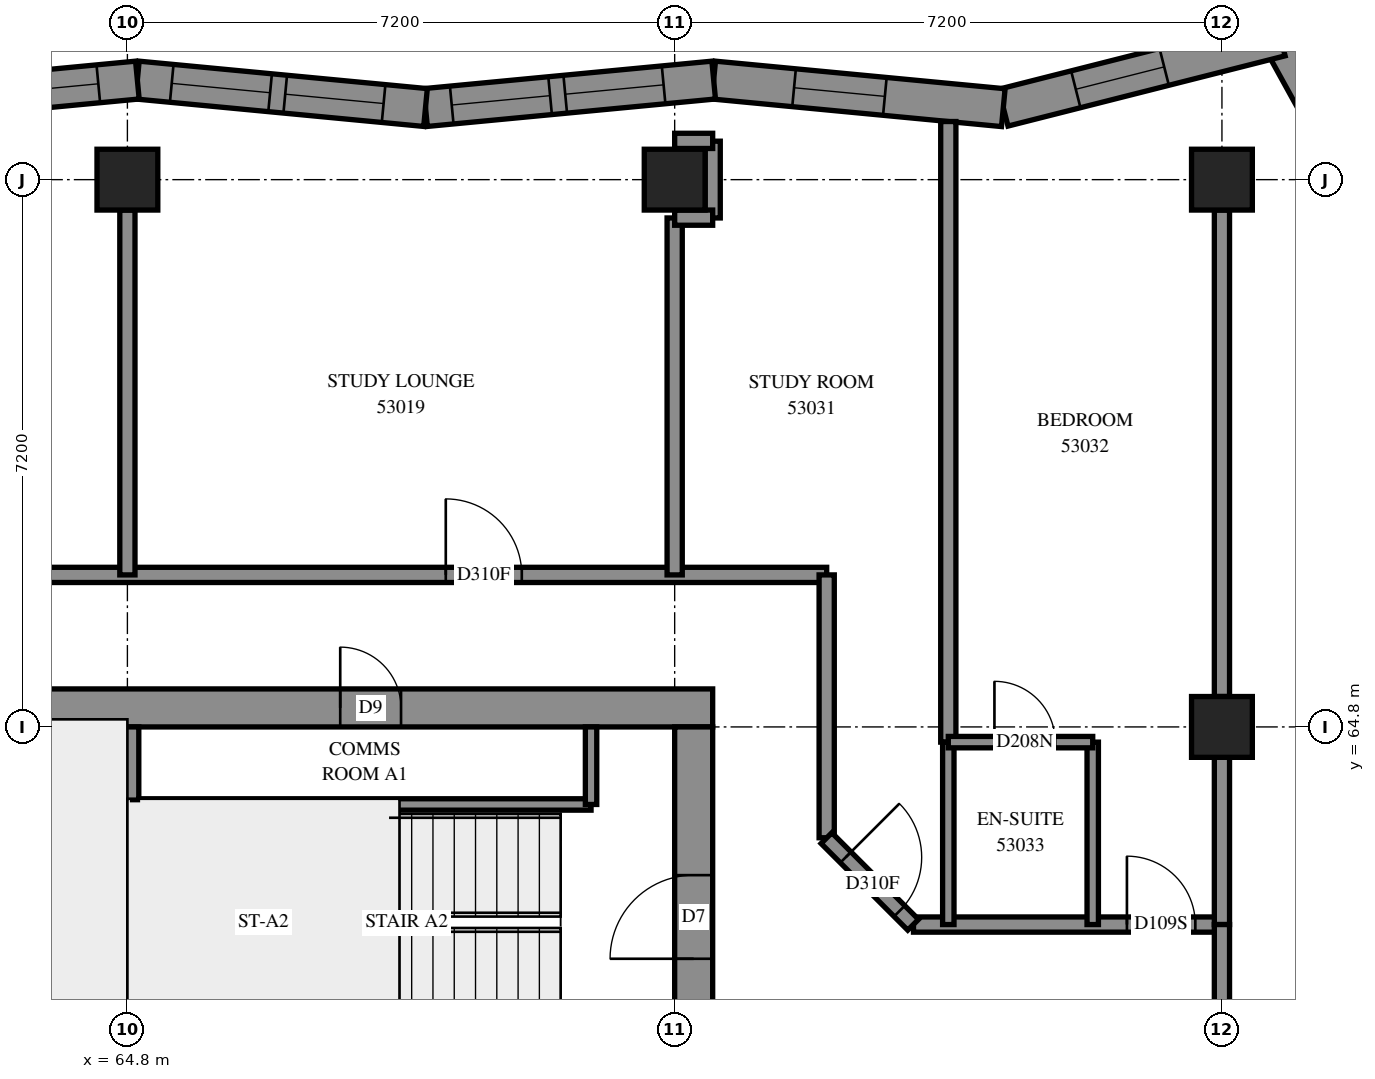
"""IFC4 building model, lengths in metres.
Left out: names, types, materials, properties, quantities, classifications, styles, units other than length and angle.
Written with IfcOpenShell. Run it as: python <this file> out.ifc"""

import sys

from ifc_helpers import new_model, si_unit, direction, frame, frame_2d, origin, origin_2d, place, context, subcontext, project, spatial, polyline, rectangle, outline, extrude, element, fill, save


model = new_model("IFC4")
c1 = context("Model", 3, precision=1e-05, world=origin(), true_north=direction((0.0, 1.0)))
c2 = subcontext(c1, "Body", "Model", "MODEL_VIEW")
j1 = project(units=[si_unit("LENGTHUNIT", "METRE"), si_unit("PLANEANGLEUNIT", "RADIAN")], contexts=[c1])
p1 = place(None, origin())
s1 = spatial("IfcSite", under=j1, at=p1, CompositionType="ELEMENT")
p2 = place(p1, origin())
s2 = spatial("IfcBuilding", under=s1, at=p2, CompositionType="ELEMENT")
p3 = place(p2, frame((0.0, 0.0, 196.4)))
s3 = spatial("IfcBuildingStorey", under=s2, at=p3, CompositionType="ELEMENT", Elevation=196.4)
for number, where, z_axis, x_axis in (
    (1, (64.8, 72.0, 0.0), (0.0, 0.0, 1.0), (1.0, 0.0, 0.0)),
    (2, (72.0, 72.0, 0.0), (0.0, 0.0, 1.0), (1.0, 0.0, 0.0)),
    (3, (79.2, 64.8, 0.0), (0.0, 0.0, 1.0), (1.0, 0.0, 0.0)),
    (4, (79.2, 72.0, 0.0), (0.0, 0.0, 1.0), (1.0, 0.0, 0.0)),
):
    element("IfcColumn", number, at=place(p3, frame(where, z_axis=z_axis, x_axis=x_axis)), inside=s3, PredefinedType="COLUMN", context=c2, shape_type="SweptSolid", body=[
        extrude(rectangle(XDim=0.8, YDim=0.8, at=origin_2d()), origin(), (0.0, 0.0, 1.0), 3.1),
    ])
p4 = place(p3, frame((57.1, 65.05, -0.3), z_axis=(0.0, 0.0, 1.0), x_axis=(1.0, 0.0, 0.0)))
e5 = element("IfcWall", 5, at=p4, inside=s3, PredefinedType="SHEAR", context=c2, shape_type="SweptSolid", body=[
    extrude(rectangle(XDim=15.4, YDim=0.5, at=frame_2d((7.7, 0.0))), origin(), (0.0, 0.0, 1.0), 2.7),
])
p5 = place(p4, frame((10.5, 0.0, 0.3)))
e6 = element("IfcOpeningElement", 6, at=p5, cuts=e5, PredefinedType="OPENING", context=c2, shape_type="SweptSolid", body=[
    extrude(rectangle(XDim=0.8, YDim=2.1, at=frame_2d((0.4, 1.05))), frame((0.0, 0.26, 0.0), z_axis=(0.0, -1.0, 0.0), x_axis=(1.0, 0.0, 0.0)), (0.0, 0.0, 1.0), 0.52),
])
p6 = place(p3, frame((72.25, 50.4, -0.3), z_axis=(0.0, 0.0, 1.0), x_axis=(0.0, 1.0, 0.0)))
e7 = element("IfcWall", 7, at=p6, inside=s3, PredefinedType="SHEAR", context=c2, shape_type="SweptSolid", body=[
    extrude(rectangle(XDim=14.4, YDim=0.5, at=frame_2d((7.2, 0.0))), origin(), (0.0, 0.0, 1.0), 2.7),
])
p7 = place(p6, frame((4.55, 0.0, 0.3)))
e8 = element("IfcOpeningElement", 8, at=p7, cuts=e7, PredefinedType="OPENING", context=c2, shape_type="SweptSolid", body=[
    extrude(rectangle(XDim=1.1, YDim=2.1, at=frame_2d((0.55, 1.05))), frame((0.0, 0.26, 0.0), z_axis=(0.0, -1.0, 0.0), x_axis=(1.0, 0.0, 0.0)), (0.0, 0.0, 1.0), 0.52),
])
p8 = place(p6, frame((11.35, 0.0, 0.3)))
e9 = element("IfcOpeningElement", 9, at=p8, cuts=e7, PredefinedType="OPENING", context=c2, shape_type="SweptSolid", body=[
    extrude(rectangle(XDim=1.1, YDim=2.1, at=frame_2d((0.55, 1.05))), frame((0.0, 0.26, 0.0), z_axis=(0.0, -1.0, 0.0), x_axis=(1.0, 0.0, 0.0)), (0.0, 0.0, 1.0), 0.52),
])
p9 = place(p3, frame((64.8, 60.6, 0.0), z_axis=(0.0, 0.0, 1.0), x_axis=(0.0, 1.0, 0.0)))
e10 = element("IfcWall", 10, at=p9, inside=s3, PredefinedType="SOLIDWALL", context=c2, shape_type="SweptSolid", body=[
    extrude(rectangle(XDim=4.2, YDim=0.3, at=frame_2d((2.1, 0.0))), origin(), (0.0, 0.0, 1.0), 3.1),
])
p10 = place(p3, frame((81.575, 70.963, 0.0), z_axis=(0.0, 0.0, 1.0), x_axis=(-0.4832922013, 0.8754591071, 0.0)))
e11 = element("IfcWall", 11, at=p10, inside=s3, PredefinedType="SOLIDWALL", context=c2, shape_type="SweptSolid", body=[
    extrude(outline(polyline([(0.049, -0.25), (3.515, -0.25), (3.129, 0.25), (-0.049, 0.25), (0.049, -0.25)])), origin(), (0.0, 0.0, 1.0), 3.1),
])
p11 = place(p10, frame((0.755, 0.0, 0.45)))
e12 = element("IfcOpeningElement", 12, at=p11, cuts=e11, PredefinedType="OPENING", context=c2, shape_type="SweptSolid", body=[
    extrude(rectangle(XDim=1.2, YDim=2.5, at=frame_2d((0.6, 1.25))), frame((0.0, 0.26, 0.0), z_axis=(0.0, -1.0, 0.0), x_axis=(1.0, 0.0, 0.0)), (0.0, 0.0, 1.0), 0.52),
])
p12 = place(p3, frame((79.969, 73.871, 0.0), z_axis=(0.0, 0.0, 1.0), x_axis=(-0.9693348908, -0.2457435035, 0.0)))
e13 = element("IfcWall", 13, at=p12, inside=s3, PredefinedType="SOLIDWALL", context=c2, shape_type="SweptSolid", body=[
    extrude(outline(polyline([(-0.193, -0.25), (3.718, -0.25), (3.805, 0.25), (0.193, 0.25), (-0.193, -0.25)])), origin(), (0.0, 0.0, 1.0), 3.1),
])
p13 = place(p12, frame((1.578, 0.0, 0.45)))
e14 = element("IfcOpeningElement", 14, at=p13, cuts=e13, PredefinedType="OPENING", context=c2, shape_type="SweptSolid", body=[
    extrude(rectangle(XDim=1.2, YDim=2.5, at=frame_2d((0.6, 1.25))), frame((0.0, 0.26, 0.0), z_axis=(0.0, -1.0, 0.0), x_axis=(1.0, 0.0, 0.0)), (0.0, 0.0, 1.0), 0.52),
])
p14 = place(p3, frame((76.324, 72.947, 0.0), z_axis=(0.0, 0.0, 1.0), x_axis=(-0.99549559, 0.0948078598, 0.0)))
e15 = element("IfcWall", 15, at=p14, inside=s3, PredefinedType="SOLIDWALL", context=c2, shape_type="SweptSolid", body=[
    extrude(outline(polyline([(0.043, -0.25), (3.852, -0.25), (3.804, 0.25), (-0.043, 0.25), (0.043, -0.25)])), origin(), (0.0, 0.0, 1.0), 3.1),
])
p15 = place(p14, frame((1.565, 0.0, 0.45)))
e16 = element("IfcOpeningElement", 16, at=p15, cuts=e15, PredefinedType="OPENING", context=c2, shape_type="SweptSolid", body=[
    extrude(rectangle(XDim=1.2, YDim=2.5, at=frame_2d((0.6, 1.25))), frame((0.0, 0.26, 0.0), z_axis=(0.0, -1.0, 0.0), x_axis=(1.0, 0.0, 0.0)), (0.0, 0.0, 1.0), 0.52),
])
p16 = place(p3, frame((72.513, 73.31, 0.0), z_axis=(0.0, 0.0, 1.0), x_axis=(-0.9954966527, -0.0947967005, 0.0)))
e17 = element("IfcWall", 17, at=p16, inside=s3, PredefinedType="SOLIDWALL", context=c2, shape_type="SweptSolid", body=[
    extrude(outline(polyline([(-0.024, -0.25), (3.784, -0.25), (3.832, 0.25), (0.024, 0.25), (-0.024, -0.25)])), origin(), (0.0, 0.0, 1.0), 3.1),
])
p17 = place(p16, frame((0.662, 0.0, 0.45)))
e18 = element("IfcOpeningElement", 18, at=p17, cuts=e17, PredefinedType="OPENING", context=c2, shape_type="SweptSolid", body=[
    extrude(rectangle(XDim=1.3, YDim=2.5, at=frame_2d((0.65, 1.25))), frame((0.0, 0.26, 0.0), z_axis=(0.0, -1.0, 0.0), x_axis=(1.0, 0.0, 0.0)), (0.0, 0.0, 1.0), 0.52),
])
p18 = place(p16, frame((2.162, 0.0, 0.45)))
e19 = element("IfcOpeningElement", 19, at=p18, cuts=e17, PredefinedType="OPENING", context=c2, shape_type="SweptSolid", body=[
    extrude(rectangle(XDim=1.3, YDim=2.5, at=frame_2d((0.65, 1.25))), frame((0.0, 0.26, 0.0), z_axis=(0.0, -1.0, 0.0), x_axis=(1.0, 0.0, 0.0)), (0.0, 0.0, 1.0), 0.52),
])
p19 = place(p3, frame((68.722, 72.949, 0.0), z_axis=(0.0, 0.0, 1.0), x_axis=(-0.9954966527, 0.0947967005, 0.0)))
e20 = element("IfcWall", 20, at=p19, inside=s3, PredefinedType="SOLIDWALL", context=c2, shape_type="SweptSolid", body=[
    extrude(outline(polyline([(0.024, -0.25), (3.832, -0.25), (3.784, 0.25), (-0.024, 0.25), (0.024, -0.25)])), origin(), (0.0, 0.0, 1.0), 3.1),
])
p20 = place(p19, frame((0.554, 0.0, 0.45)))
e21 = element("IfcOpeningElement", 21, at=p20, cuts=e20, PredefinedType="OPENING", context=c2, shape_type="SweptSolid", body=[
    extrude(rectangle(XDim=1.3, YDim=2.5, at=frame_2d((0.65, 1.25))), frame((0.0, 0.26, 0.0), z_axis=(0.0, -1.0, 0.0), x_axis=(1.0, 0.0, 0.0)), (0.0, 0.0, 1.0), 0.52),
])
p21 = place(p19, frame((2.054, 0.0, 0.45)))
e22 = element("IfcOpeningElement", 22, at=p21, cuts=e20, PredefinedType="OPENING", context=c2, shape_type="SweptSolid", body=[
    extrude(rectangle(XDim=1.3, YDim=2.5, at=frame_2d((0.65, 1.25))), frame((0.0, 0.26, 0.0), z_axis=(0.0, -1.0, 0.0), x_axis=(1.0, 0.0, 0.0)), (0.0, 0.0, 1.0), 0.52),
])
p22 = place(p3, frame((64.931, 73.31, 0.0), z_axis=(0.0, 0.0, 1.0), x_axis=(-0.9954966527, -0.0947967005, 0.0)))
e23 = element("IfcWall", 23, at=p22, inside=s3, PredefinedType="SOLIDWALL", context=c2, shape_type="SweptSolid", body=[
    extrude(outline(polyline([(-0.024, -0.25), (3.784, -0.25), (3.832, 0.25), (0.024, 0.25), (-0.024, -0.25)])), origin(), (0.0, 0.0, 1.0), 3.1),
])
p23 = place(p22, frame((0.516, 0.0, 0.45)))
e24 = element("IfcOpeningElement", 24, at=p23, cuts=e23, PredefinedType="OPENING", context=c2, shape_type="SweptSolid", body=[
    extrude(rectangle(XDim=1.3, YDim=2.5, at=frame_2d((0.65, 1.25))), frame((0.0, 0.26, 0.0), z_axis=(0.0, -1.0, 0.0), x_axis=(1.0, 0.0, 0.0)), (0.0, 0.0, 1.0), 0.52),
])
p24 = place(p22, frame((2.016, 0.0, 0.45)))
e25 = element("IfcOpeningElement", 25, at=p24, cuts=e23, PredefinedType="OPENING", context=c2, shape_type="SweptSolid", body=[
    extrude(rectangle(XDim=1.3, YDim=2.5, at=frame_2d((0.65, 1.25))), frame((0.0, 0.26, 0.0), z_axis=(0.0, -1.0, 0.0), x_axis=(1.0, 0.0, 0.0)), (0.0, 0.0, 1.0), 0.52),
])
p25 = place(p3, frame((64.95, 63.78, 0.0), z_axis=(0.0, 0.0, 1.0), x_axis=(1.0, 0.0, 0.0)))
e26 = element("IfcWall", 26, at=p25, inside=s3, PredefinedType="PARTITIONING", context=c2, shape_type="SweptSolid", body=[
    extrude(rectangle(XDim=5.95, YDim=0.15, at=frame_2d((2.975, 0.0))), origin(), (0.0, 0.0, 1.0), 3.1),
])
p26 = place(p3, frame((70.9, 63.78, 0.0), z_axis=(0.0, 0.0, 1.0), x_axis=(0.0, 1.0, 0.0)))
e27 = element("IfcWall", 27, at=p26, inside=s3, PredefinedType="PARTITIONING", context=c2, shape_type="SweptSolid", body=[
    extrude(rectangle(XDim=1.02, YDim=0.15, at=frame_2d((0.51, 0.0))), origin(), (0.0, 0.0, 1.0), 3.1),
])
p27 = place(p3, frame((55.6, 66.8, 0.0), z_axis=(0.0, 0.0, 1.0), x_axis=(1.0, 0.0, 0.0)))
e28 = element("IfcWall", 28, at=p27, inside=s3, PredefinedType="PARTITIONING", context=c2, shape_type="SweptSolid", body=[
    extrude(rectangle(XDim=18.4, YDim=0.2, at=frame_2d((9.2, 0.0))), origin(), (0.0, 0.0, 1.0), 3.1),
])
p28 = place(p27, frame((5.886, 0.0, 0.0)))
e29 = element("IfcOpeningElement", 29, at=p28, cuts=e28, PredefinedType="OPENING", context=c2, shape_type="SweptSolid", body=[
    extrude(rectangle(XDim=1.0, YDim=2.1, at=frame_2d((0.5, 1.05))), frame((0.0, 0.11, 0.0), z_axis=(0.0, -1.0, 0.0), x_axis=(1.0, 0.0, 0.0)), (0.0, 0.0, 1.0), 0.22),
])
p29 = place(p27, frame((13.389, 0.0, 0.0)))
e30 = element("IfcOpeningElement", 30, at=p29, cuts=e28, PredefinedType="OPENING", context=c2, shape_type="SweptSolid", body=[
    extrude(rectangle(XDim=1.0, YDim=2.1, at=frame_2d((0.5, 1.05))), frame((0.0, 0.11, 0.0), z_axis=(0.0, -1.0, 0.0), x_axis=(1.0, 0.0, 0.0)), (0.0, 0.0, 1.0), 0.22),
])
p30 = place(p3, frame((75.6, 64.6, 0.0), z_axis=(0.0, 0.0, 1.0), x_axis=(0.0, 1.0, 0.0)))
e31 = element("IfcWall", 31, at=p30, inside=s3, PredefinedType="PARTITIONING", context=c2, shape_type="SweptSolid", body=[
    extrude(rectangle(XDim=8.165, YDim=0.2, at=frame_2d((4.082, 0.0))), origin(), (0.0, 0.0, 1.0), 3.1),
])
p31 = place(p3, frame((79.2, 65.2, 0.0), z_axis=(0.0, 0.0, 1.0), x_axis=(0.0, 1.0, 0.0)))
e32 = element("IfcWall", 32, at=p31, inside=s3, PredefinedType="PARTITIONING", context=c2, shape_type="SweptSolid", body=[
    extrude(rectangle(XDim=6.4, YDim=0.2, at=frame_2d((3.2, 0.0))), origin(), (0.0, 0.0, 1.0), 3.1),
])
p32 = place(p3, frame((64.8, 66.8, 0.0), z_axis=(0.0, 0.0, 1.0), x_axis=(0.0, 1.0, 0.0)))
e33 = element("IfcWall", 33, at=p32, inside=s3, PredefinedType="PARTITIONING", context=c2, shape_type="SweptSolid", body=[
    extrude(rectangle(XDim=4.8, YDim=0.2, at=frame_2d((2.4, 0.0))), origin(), (0.0, 0.0, 1.0), 3.1),
])
p33 = place(p3, frame((72.0, 66.8, 0.0), z_axis=(0.0, 0.0, 1.0), x_axis=(0.0, 1.0, 0.0)))
e34 = element("IfcWall", 34, at=p33, inside=s3, PredefinedType="PARTITIONING", context=c2, shape_type="SweptSolid", body=[
    extrude(rectangle(XDim=4.696, YDim=0.2, at=frame_2d((2.348, 0.0))), origin(), (0.0, 0.0, 1.0), 3.1),
])
p34 = place(p3, frame((75.142, 62.2, 0.0), z_axis=(0.0, 0.0, 1.0), x_axis=(1.0, 0.0, 0.0)))
e35 = element("IfcWall", 35, at=p34, inside=s3, PredefinedType="PARTITIONING", context=c2, shape_type="SweptSolid", body=[
    extrude(rectangle(XDim=4.058, YDim=0.2, at=frame_2d((2.029, 0.0))), origin(), (0.0, 0.0, 1.0), 3.1),
])
p35 = place(p34, frame((2.808, 0.0, 0.0)))
e36 = element("IfcOpeningElement", 36, at=p35, cuts=e35, PredefinedType="OPENING", context=c2, shape_type="SweptSolid", body=[
    extrude(rectangle(XDim=0.9, YDim=2.1, at=frame_2d((0.45, 1.05))), frame((0.0, 0.11, 0.0), z_axis=(0.0, -1.0, 0.0), x_axis=(1.0, 0.0, 0.0)), (0.0, 0.0, 1.0), 0.22),
])
p36 = place(p3, frame((74.0, 63.342, 0.0), z_axis=(0.0, 0.0, 1.0), x_axis=(0.0, 1.0, 0.0)))
e37 = element("IfcWall", 37, at=p36, inside=s3, PredefinedType="PARTITIONING", context=c2, shape_type="SweptSolid", body=[
    extrude(rectangle(XDim=3.458, YDim=0.2, at=frame_2d((1.729, 0.0))), origin(), (0.0, 0.0, 1.0), 3.1),
])
for number, where, z_axis, x_axis in (
    (38, (75.6, 62.2, 0.0), (0.0, 0.0, 1.0), (0.0, 1.0, 0.0)),
    (39, (77.5, 62.2, 0.0), (0.0, 0.0, 1.0), (0.0, 1.0, 0.0)),
):
    element("IfcWall", number, at=place(p3, frame(where, z_axis=z_axis, x_axis=x_axis)), inside=s3, PredefinedType="PARTITIONING", context=c2, shape_type="SweptSolid", body=[
        extrude(rectangle(XDim=2.4, YDim=0.15, at=frame_2d((1.2, 0.0))), origin(), (0.0, 0.0, 1.0), 3.1),
    ])
p37 = place(p3, frame((79.2, 62.2, 0.0), z_axis=(0.0, 0.0, 1.0), x_axis=(0.0, 1.0, 0.0)))
e40 = element("IfcWall", 40, at=p37, inside=s3, PredefinedType="PARTITIONING", context=c2, shape_type="SweptSolid", body=[
    extrude(rectangle(XDim=2.2, YDim=0.2, at=frame_2d((1.1, 0.0))), origin(), (0.0, 0.0, 1.0), 3.1),
])
p38 = place(p3, frame((79.2, 60.2, 0.0), z_axis=(0.0, 0.0, 1.0), x_axis=(0.0, 1.0, 0.0)))
e41 = element("IfcWall", 41, at=p38, inside=s3, PredefinedType="PARTITIONING", context=c2, shape_type="SweptSolid", body=[
    extrude(rectangle(XDim=2.0, YDim=0.2, at=frame_2d((1.0, 0.0))), origin(), (0.0, 0.0, 1.0), 3.1),
])
p39 = place(p3, frame((75.6, 64.6, 0.0), z_axis=(0.0, 0.0, 1.0), x_axis=(1.0, 0.0, 0.0)))
e42 = element("IfcWall", 42, at=p39, inside=s3, PredefinedType="PARTITIONING", context=c2, shape_type="SweptSolid", body=[
    extrude(rectangle(XDim=1.9, YDim=0.15, at=frame_2d((0.95, 0.0))), origin(), (0.0, 0.0, 1.0), 3.1),
])
p40 = place(p39, frame((0.607, 0.0, 0.0)))
e43 = element("IfcOpeningElement", 43, at=p40, cuts=e42, PredefinedType="OPENING", context=c2, shape_type="SweptSolid", body=[
    extrude(rectangle(XDim=0.8, YDim=2.1, at=frame_2d((0.4, 1.05))), frame((0.0, 0.085, 0.0), z_axis=(0.0, -1.0, 0.0), x_axis=(1.0, 0.0, 0.0)), (0.0, 0.0, 1.0), 0.17),
])
p41 = place(p3, frame((73.997, 63.337, 0.0), z_axis=(0.0, 0.0, 1.0), x_axis=(0.7071067812, -0.7071067812, 0.0)))
e44 = element("IfcWall", 44, at=p41, inside=s3, PredefinedType="PARTITIONING", context=c2, shape_type="SweptSolid", body=[
    extrude(rectangle(XDim=1.612, YDim=0.2, at=frame_2d((0.806, 0.0))), origin(), (0.0, 0.0, 1.0), 3.1),
])
p42 = place(p41, frame((0.357, 0.0, 0.0)))
e45 = element("IfcOpeningElement", 45, at=p42, cuts=e44, PredefinedType="OPENING", context=c2, shape_type="SweptSolid", body=[
    extrude(rectangle(XDim=1.0, YDim=2.1, at=frame_2d((0.5, 1.05))), frame((0.0, 0.11, 0.0), z_axis=(0.0, -1.0, 0.0), x_axis=(1.0, 0.0, 0.0)), (0.0, 0.0, 1.0), 0.22),
])
p43 = place(p3, frame((72.5, 71.496, 0.0), z_axis=(0.0, 0.0, 1.0), x_axis=(0.0, 1.0, 0.0)))
e46 = element("IfcWall", 46, at=p43, inside=s3, PredefinedType="PARTITIONING", context=c2, shape_type="SweptSolid", body=[
    extrude(rectangle(XDim=1.01, YDim=0.2, at=frame_2d((0.505, 0.0))), origin(), (0.0, 0.0, 1.0), 3.1),
])
for number, where, z_axis, x_axis in (
    (47, (72.0, 72.51, 0.0), (0.0, 0.0, 1.0), (1.0, 0.0, 0.0)),
    (48, (72.0, 71.5, 0.0), (0.0, 0.0, 1.0), (1.0, 0.0, 0.0)),
):
    element("IfcWall", number, at=place(p3, frame(where, z_axis=z_axis, x_axis=x_axis)), inside=s3, PredefinedType="PARTITIONING", context=c2, shape_type="SweptSolid", body=[
        extrude(rectangle(XDim=0.5, YDim=0.2, at=frame_2d((0.25, 0.0))), origin(), (0.0, 0.0, 1.0), 3.1),
    ])
p44 = place(p13, origin())
e49 = element("IfcWindow", 49, at=p44, inside=s3, PartitioningType="SINGLE_PANEL", PredefinedType="WINDOW", context=c2, shape_type="SweptSolid", body=[
    extrude(rectangle(XDim=1.2, YDim=2.5, at=frame_2d((0.6, 1.25))), frame((0.0, 0.18, 0.0), z_axis=(0.0, -1.0, 0.0), x_axis=(1.0, 0.0, 0.0)), (0.0, 0.0, 1.0), 0.06),
])
fill(e14, e49)
p45 = place(p15, origin())
e50 = element("IfcWindow", 50, at=p45, inside=s3, PartitioningType="SINGLE_PANEL", PredefinedType="WINDOW", context=c2, shape_type="SweptSolid", body=[
    extrude(rectangle(XDim=1.2, YDim=2.5, at=frame_2d((0.6, 1.25))), frame((0.0, 0.18, 0.0), z_axis=(0.0, -1.0, 0.0), x_axis=(1.0, 0.0, 0.0)), (0.0, 0.0, 1.0), 0.06),
])
fill(e16, e50)
p46 = place(p17, origin())
e51 = element("IfcWindow", 51, at=p46, inside=s3, PartitioningType="SINGLE_PANEL", PredefinedType="WINDOW", context=c2, shape_type="SweptSolid", body=[
    extrude(rectangle(XDim=1.3, YDim=2.5, at=frame_2d((0.65, 1.25))), frame((0.0, 0.18, 0.0), z_axis=(0.0, -1.0, 0.0), x_axis=(1.0, 0.0, 0.0)), (0.0, 0.0, 1.0), 0.06),
])
fill(e18, e51)
p47 = place(p18, origin())
e52 = element("IfcWindow", 52, at=p47, inside=s3, PartitioningType="SINGLE_PANEL", PredefinedType="WINDOW", context=c2, shape_type="SweptSolid", body=[
    extrude(rectangle(XDim=1.3, YDim=2.5, at=frame_2d((0.65, 1.25))), frame((0.0, 0.18, 0.0), z_axis=(0.0, -1.0, 0.0), x_axis=(1.0, 0.0, 0.0)), (0.0, 0.0, 1.0), 0.06),
])
fill(e19, e52)
p48 = place(p20, origin())
e53 = element("IfcWindow", 53, at=p48, inside=s3, PartitioningType="SINGLE_PANEL", PredefinedType="WINDOW", context=c2, shape_type="SweptSolid", body=[
    extrude(rectangle(XDim=1.3, YDim=2.5, at=frame_2d((0.65, 1.25))), frame((0.0, 0.18, 0.0), z_axis=(0.0, -1.0, 0.0), x_axis=(1.0, 0.0, 0.0)), (0.0, 0.0, 1.0), 0.06),
])
fill(e21, e53)
p49 = place(p21, origin())
e54 = element("IfcWindow", 54, at=p49, inside=s3, PartitioningType="SINGLE_PANEL", PredefinedType="WINDOW", context=c2, shape_type="SweptSolid", body=[
    extrude(rectangle(XDim=1.3, YDim=2.5, at=frame_2d((0.65, 1.25))), frame((0.0, 0.18, 0.0), z_axis=(0.0, -1.0, 0.0), x_axis=(1.0, 0.0, 0.0)), (0.0, 0.0, 1.0), 0.06),
])
fill(e22, e54)
p50 = place(p23, origin())
e55 = element("IfcWindow", 55, at=p50, inside=s3, PartitioningType="SINGLE_PANEL", PredefinedType="WINDOW", context=c2, shape_type="SweptSolid", body=[
    extrude(rectangle(XDim=1.3, YDim=2.5, at=frame_2d((0.65, 1.25))), frame((0.0, 0.18, 0.0), z_axis=(0.0, -1.0, 0.0), x_axis=(1.0, 0.0, 0.0)), (0.0, 0.0, 1.0), 0.06),
])
fill(e24, e55)
p51 = place(p5, origin())
e56 = element("IfcDoor", 56, at=p51, inside=s3, OperationType="SINGLE_SWING_RIGHT", PredefinedType="DOOR", context=c2, shape_type="SweptSolid", body=[
    extrude(rectangle(XDim=0.8, YDim=2.1, at=frame_2d((0.4, 1.05))), frame((0.0, 0.025, 0.0), z_axis=(0.0, -1.0, 0.0), x_axis=(1.0, 0.0, 0.0)), (0.0, 0.0, 1.0), 0.05),
])
fill(e6, e56)
p52 = place(p8, origin())
e57 = element("IfcDoor", 57, at=p52, inside=s3, OperationType="SINGLE_SWING_RIGHT", PredefinedType="DOOR", context=c2, shape_type="SweptSolid", body=[
    extrude(rectangle(XDim=1.1, YDim=2.1, at=frame_2d((0.55, 1.05))), frame((0.0, 0.025, 0.0), z_axis=(0.0, -1.0, 0.0), x_axis=(1.0, 0.0, 0.0)), (0.0, 0.0, 1.0), 0.05),
])
fill(e9, e57)
p53 = place(p29, origin())
e58 = element("IfcDoor", 58, at=p53, inside=s3, OperationType="SINGLE_SWING_RIGHT", PredefinedType="DOOR", context=c2, shape_type="SweptSolid", body=[
    extrude(rectangle(XDim=1.0, YDim=2.1, at=frame_2d((0.5, 1.05))), frame((0.0, 0.025, 0.0), z_axis=(0.0, -1.0, 0.0), x_axis=(1.0, 0.0, 0.0)), (0.0, 0.0, 1.0), 0.05),
])
fill(e30, e58)
p54 = place(p42, origin())
e59 = element("IfcDoor", 59, at=p54, inside=s3, OperationType="SINGLE_SWING_RIGHT", PredefinedType="DOOR", context=c2, shape_type="SweptSolid", body=[
    extrude(rectangle(XDim=1.0, YDim=2.1, at=frame_2d((0.5, 1.05))), frame((0.0, 0.025, 0.0), z_axis=(0.0, -1.0, 0.0), x_axis=(1.0, 0.0, 0.0)), (0.0, 0.0, 1.0), 0.05),
])
fill(e45, e59)
p55 = place(p35, origin())
e60 = element("IfcDoor", 60, at=p55, inside=s3, OperationType="SINGLE_SWING_LEFT", PredefinedType="DOOR", context=c2, shape_type="SweptSolid", body=[
    extrude(rectangle(XDim=0.9, YDim=2.1, at=frame_2d((0.45, 1.05))), frame((0.0, 0.025, 0.0), z_axis=(0.0, -1.0, 0.0), x_axis=(1.0, 0.0, 0.0)), (0.0, 0.0, 1.0), 0.05),
])
fill(e36, e60)
p56 = place(p40, origin())
e61 = element("IfcDoor", 61, at=p56, inside=s3, OperationType="SINGLE_SWING_RIGHT", PredefinedType="DOOR", context=c2, shape_type="SweptSolid", body=[
    extrude(rectangle(XDim=0.8, YDim=2.1, at=frame_2d((0.4, 1.05))), frame((0.0, 0.025, 0.0), z_axis=(0.0, -1.0, 0.0), x_axis=(1.0, 0.0, 0.0)), (0.0, 0.0, 1.0), 0.05),
])
fill(e43, e61)
save(model, sys.argv[1])
